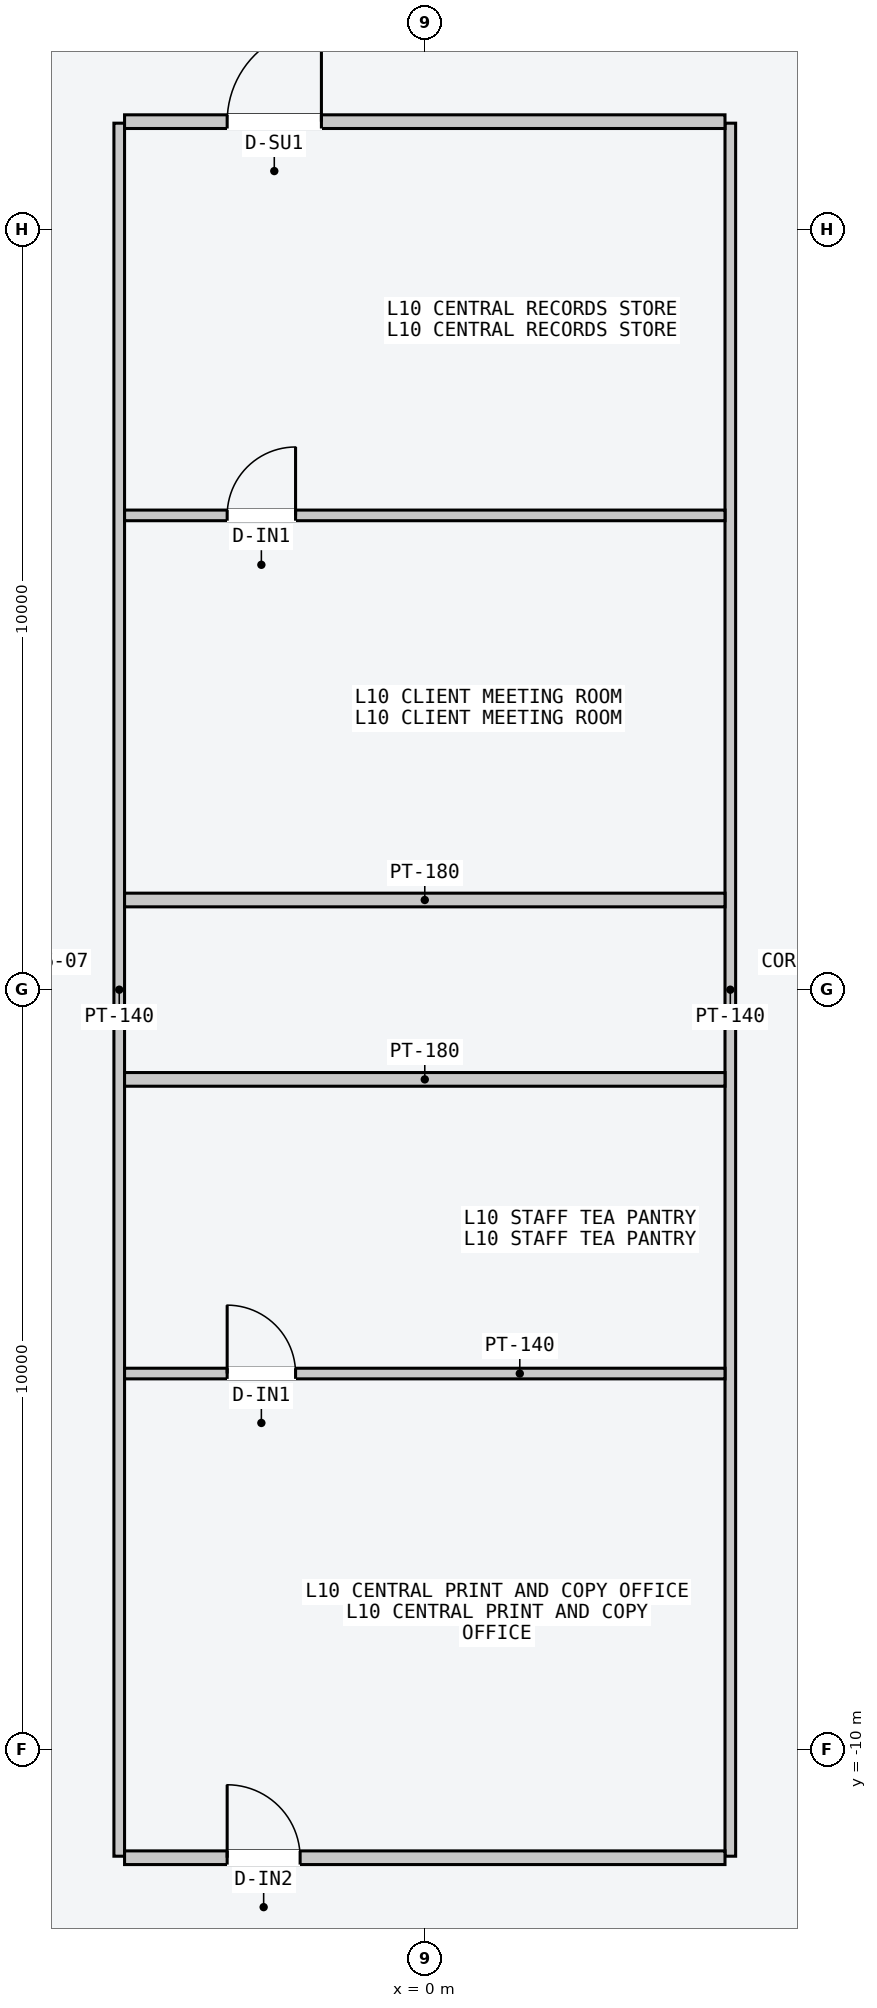
"""IFC4 building model, lengths in metres.
Left out: names, types, materials, properties, quantities, classifications, styles, units other than length and angle.
Written with IfcOpenShell. Run it as: python <this file> out.ifc"""

import sys

from ifc_helpers import new_model, si_unit, direction, frame, frame_2d, origin, place, context, subcontext, project, spatial, rectangle, extrude, element, fill, save


model = new_model("IFC4")
c1 = context("Model", 3, precision=1e-05, world=origin(), true_north=direction((0.0, 1.0)))
c2 = subcontext(c1, "Body", "Model", "MODEL_VIEW")
j1 = project(units=[si_unit("LENGTHUNIT", "METRE"), si_unit("PLANEANGLEUNIT", "RADIAN")], contexts=[c1])
p1 = place(None, origin())
s1 = spatial("IfcSite", under=j1, at=p1, CompositionType="ELEMENT")
p2 = place(p1, origin())
s2 = spatial("IfcBuilding", under=s1, at=p2, CompositionType="ELEMENT")
p3 = place(p2, frame((0.0, 0.0, 42.0)))
s3 = spatial("IfcBuildingStorey", under=s2, at=p3, CompositionType="ELEMENT", Elevation=42.0)
for number, where, z_axis, x_axis in (
    (1, (-4.02, -11.4, 0.0), (0.0, 0.0, 1.0), (0.0, 1.0, 0.0)),
    (2, (4.02, -11.4, 0.0), (0.0, 0.0, 1.0), (0.0, 1.0, 0.0)),
):
    element("IfcWall", number, at=place(p3, frame(where, z_axis=z_axis, x_axis=x_axis)), inside=s3, PredefinedType="PARTITIONING", context=c2, shape_type="SweptSolid", body=[
        extrude(rectangle(XDim=22.8, YDim=0.14, at=frame_2d((11.4, 0.0))), origin(), (0.0, 0.0, 1.0), 3.4),
    ])
p4 = place(p3, frame((-3.95, 1.18, 0.0), z_axis=(0.0, 0.0, 1.0), x_axis=(1.0, 0.0, 0.0)))
e3 = element("IfcWall", 3, at=p4, inside=s3, PredefinedType="PARTITIONING", context=c2, shape_type="SweptSolid", body=[
    extrude(rectangle(XDim=7.9, YDim=0.18, at=frame_2d((3.95, 0.0))), origin(), (0.0, 0.0, 1.0), 3.4),
])
p5 = place(p3, frame((-3.95, 11.42, 0.0), z_axis=(0.0, 0.0, 1.0), x_axis=(1.0, 0.0, 0.0)))
e4 = element("IfcWall", 4, at=p5, inside=s3, PredefinedType="PARTITIONING", context=c2, shape_type="SweptSolid", body=[
    extrude(rectangle(XDim=7.9, YDim=0.18, at=frame_2d((3.95, 0.0))), origin(), (0.0, 0.0, 1.0), 3.4),
])
p6 = place(p5, frame((1.35, 0.0, 0.0)))
e5 = element("IfcOpeningElement", 5, at=p6, cuts=e4, PredefinedType="OPENING", context=c2, shape_type="SweptSolid", body=[
    extrude(rectangle(XDim=1.24, YDim=2.24, at=frame_2d((0.62, 1.12))), frame((0.0, 0.1, 0.0), z_axis=(0.0, -1.0, 0.0), x_axis=(1.0, 0.0, 0.0)), (0.0, 0.0, 1.0), 0.2),
])
p7 = place(p3, frame((-3.95, -1.18, 0.0), z_axis=(0.0, 0.0, 1.0), x_axis=(1.0, 0.0, 0.0)))
e6 = element("IfcWall", 6, at=p7, inside=s3, PredefinedType="PARTITIONING", context=c2, shape_type="SweptSolid", body=[
    extrude(rectangle(XDim=7.9, YDim=0.18, at=frame_2d((3.95, 0.0))), origin(), (0.0, 0.0, 1.0), 3.4),
])
p8 = place(p3, frame((-3.95, -11.42, 0.0), z_axis=(0.0, 0.0, 1.0), x_axis=(1.0, 0.0, 0.0)))
e7 = element("IfcWall", 7, at=p8, inside=s3, PredefinedType="PARTITIONING", context=c2, shape_type="SweptSolid", body=[
    extrude(rectangle(XDim=7.9, YDim=0.18, at=frame_2d((3.95, 0.0))), origin(), (0.0, 0.0, 1.0), 3.4),
])
p9 = place(p8, frame((1.35, 0.0, 0.0)))
e8 = element("IfcOpeningElement", 8, at=p9, cuts=e7, PredefinedType="OPENING", context=c2, shape_type="SweptSolid", body=[
    extrude(rectangle(XDim=0.96, YDim=2.18, at=frame_2d((0.48, 1.09))), frame((0.0, 0.1, 0.0), z_axis=(0.0, -1.0, 0.0), x_axis=(1.0, 0.0, 0.0)), (0.0, 0.0, 1.0), 0.2),
])
p10 = place(p3, frame((-3.95, 6.24, 0.0), z_axis=(0.0, 0.0, 1.0), x_axis=(1.0, 0.0, 0.0)))
e9 = element("IfcWall", 9, at=p10, inside=s3, PredefinedType="PARTITIONING", context=c2, shape_type="SweptSolid", body=[
    extrude(rectangle(XDim=7.9, YDim=0.14, at=frame_2d((3.95, 0.0))), origin(), (0.0, 0.0, 1.0), 3.4),
])
p11 = place(p10, frame((1.35, 0.0, 0.0)))
e10 = element("IfcOpeningElement", 10, at=p11, cuts=e9, PredefinedType="OPENING", context=c2, shape_type="SweptSolid", body=[
    extrude(rectangle(XDim=0.9, YDim=2.15, at=frame_2d((0.45, 1.075))), frame((0.0, 0.08, 0.0), z_axis=(0.0, -1.0, 0.0), x_axis=(1.0, 0.0, 0.0)), (0.0, 0.0, 1.0), 0.16),
])
p12 = place(p3, frame((-3.95, -5.05, 0.0), z_axis=(0.0, 0.0, 1.0), x_axis=(1.0, 0.0, 0.0)))
e11 = element("IfcWall", 11, at=p12, inside=s3, PredefinedType="PARTITIONING", context=c2, shape_type="SweptSolid", body=[
    extrude(rectangle(XDim=7.9, YDim=0.14, at=frame_2d((3.95, 0.0))), origin(), (0.0, 0.0, 1.0), 3.4),
])
p13 = place(p12, frame((1.35, 0.0, 0.0)))
e12 = element("IfcOpeningElement", 12, at=p13, cuts=e11, PredefinedType="OPENING", context=c2, shape_type="SweptSolid", body=[
    extrude(rectangle(XDim=0.9, YDim=2.15, at=frame_2d((0.45, 1.075))), frame((0.0, 0.08, 0.0), z_axis=(0.0, -1.0, 0.0), x_axis=(1.0, 0.0, 0.0)), (0.0, 0.0, 1.0), 0.16),
])
p14 = place(p6, origin())
e13 = element("IfcDoor", 13, at=p14, inside=s3, OperationType="SINGLE_SWING_RIGHT", PredefinedType="DOOR", context=c2, shape_type="SweptSolid", body=[
    extrude(rectangle(XDim=1.24, YDim=2.24, at=frame_2d((0.62, 1.12))), frame((0.0, 0.025, 0.0), z_axis=(0.0, -1.0, 0.0), x_axis=(1.0, 0.0, 0.0)), (0.0, 0.0, 1.0), 0.05),
])
fill(e5, e13)
p15 = place(p9, origin())
e14 = element("IfcDoor", 14, at=p15, inside=s3, OperationType="SINGLE_SWING_LEFT", PredefinedType="DOOR", context=c2, shape_type="SweptSolid", body=[
    extrude(rectangle(XDim=0.96, YDim=2.18, at=frame_2d((0.48, 1.09))), frame((0.0, 0.025, 0.0), z_axis=(0.0, -1.0, 0.0), x_axis=(1.0, 0.0, 0.0)), (0.0, 0.0, 1.0), 0.05),
])
fill(e8, e14)
p16 = place(p11, origin())
e15 = element("IfcDoor", 15, at=p16, inside=s3, OperationType="SINGLE_SWING_RIGHT", PredefinedType="DOOR", context=c2, shape_type="SweptSolid", body=[
    extrude(rectangle(XDim=0.9, YDim=2.15, at=frame_2d((0.45, 1.075))), frame((0.0, 0.025, 0.0), z_axis=(0.0, -1.0, 0.0), x_axis=(1.0, 0.0, 0.0)), (0.0, 0.0, 1.0), 0.05),
])
fill(e10, e15)
p17 = place(p13, origin())
e16 = element("IfcDoor", 16, at=p17, inside=s3, OperationType="SINGLE_SWING_LEFT", PredefinedType="DOOR", context=c2, shape_type="SweptSolid", body=[
    extrude(rectangle(XDim=0.9, YDim=2.15, at=frame_2d((0.45, 1.075))), frame((0.0, 0.025, 0.0), z_axis=(0.0, -1.0, 0.0), x_axis=(1.0, 0.0, 0.0)), (0.0, 0.0, 1.0), 0.05),
])
fill(e12, e16)
save(model, sys.argv[1])
